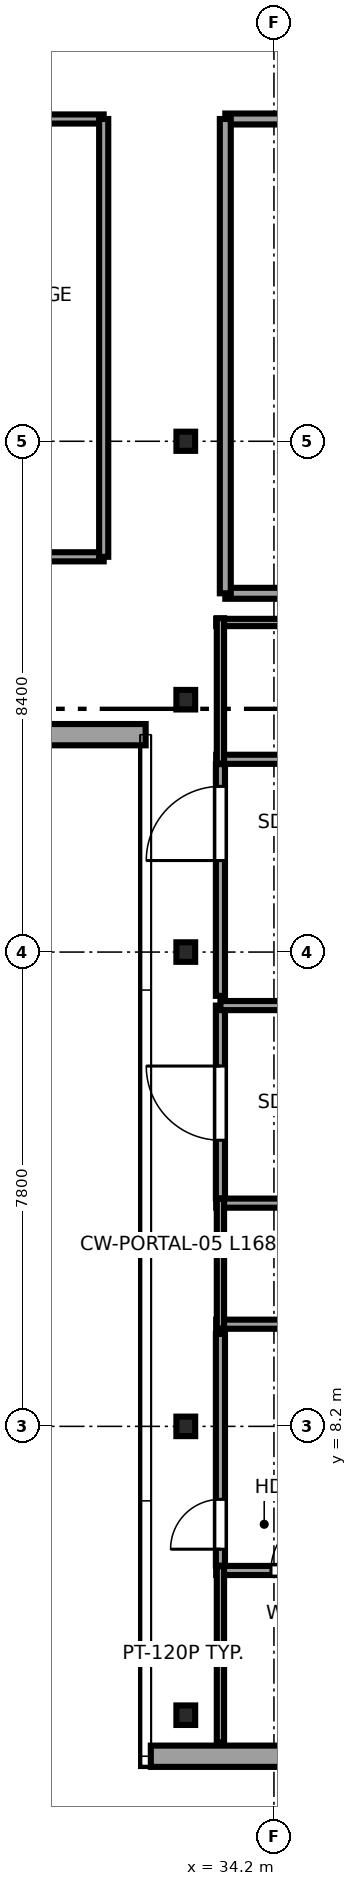
"""IFC4 building model, lengths in metres.
Left out: names, types, materials, properties, quantities, classifications, styles, units other than length and angle.
Written with IfcOpenShell. Run it as: python <this file> out.ifc"""

import sys

from ifc_helpers import new_model, si_unit, direction, frame, frame_2d, origin, origin_2d, place, context, subcontext, project, spatial, rectangle, i_section, extrude, source, transform, mapped, element, fill, save


model = new_model("IFC4")
c1 = context("Model", 3, precision=1e-05, world=origin(), true_north=direction((0.0, 1.0)))
c2 = subcontext(c1, "Body", "Model", "MODEL_VIEW")
j1 = project(units=[si_unit("LENGTHUNIT", "METRE"), si_unit("PLANEANGLEUNIT", "RADIAN")], contexts=[c1])
p1 = place(None, origin())
s1 = spatial("IfcSite", under=j1, at=p1, CompositionType="ELEMENT")
p2 = place(p1, origin())
s2 = spatial("IfcBuilding", under=s1, at=p2, CompositionType="ELEMENT")
p3 = place(p2, frame((0.0, 0.0, 259.4)))
s3 = spatial("IfcBuildingStorey", under=s2, at=p3, CompositionType="ELEMENT", Elevation=259.4)
m1 = source(origin(), c2, "Body", "SweptSolid", [
    extrude(i_section(OverallWidth=0.309, OverallDepth=0.321, WebThickness=0.014, FlangeThickness=0.022, FilletRadius=0.017, at=origin_2d()), origin(), (0.0, 0.0, 1.0), 3.55),
])
for number, where, z_axis, x_axis in (
    (1, (32.75, 3.45, 0.0), (0.0, 0.0, 1.0), (1.0, 0.0, 0.0)),
    (2, (32.75, 8.2, 0.0), (0.0, 0.0, 1.0), (1.0, 0.0, 0.0)),
    (3, (32.75, 16.0, 0.0), (0.0, 0.0, 1.0), (1.0, 0.0, 0.0)),
):
    element("IfcColumn", number, at=place(p3, frame(where, z_axis=z_axis, x_axis=x_axis)), inside=s3, PredefinedType="COLUMN", context=c2, shape_type="MappedRepresentation", body=[
        mapped(m1, transform((0.0, 0.0, 0.0), x_axis=(1.0, 0.0, 0.0), y_axis=(0.0, 1.0, 0.0), z_axis=(0.0, 0.0, 1.0), scale=1.0)),
    ])
m2 = source(origin(), c2, "Body", "SweptSolid", [
    extrude(i_section(OverallWidth=0.307, OverallDepth=0.315, WebThickness=0.012, FlangeThickness=0.019, FilletRadius=0.017, at=origin_2d()), origin(), (0.0, 0.0, 1.0), 3.55),
])
p4 = place(p3, frame((32.75, 24.4, 0.0), z_axis=(0.0, 0.0, 1.0), x_axis=(1.0, 0.0, 0.0)))
e4 = element("IfcColumn", 4, at=p4, inside=s3, PredefinedType="COLUMN", context=c2, shape_type="MappedRepresentation", body=[
    mapped(m2, transform((0.0, 0.0, 0.0), x_axis=(1.0, 0.0, 0.0), y_axis=(0.0, 1.0, 0.0), z_axis=(0.0, 0.0, 1.0), scale=1.0)),
])
p5 = place(p3, frame((32.75, 20.15, 0.0), z_axis=(0.0, 0.0, 1.0), x_axis=(1.0, 0.0, 0.0)))
e5 = element("IfcColumn", 5, at=p5, inside=s3, PredefinedType="COLUMN", context=c2, shape_type="MappedRepresentation", body=[
    mapped(m1, transform((0.0, 0.0, 0.0), x_axis=(1.0, 0.0, 0.0), y_axis=(0.0, 1.0, 0.0), z_axis=(0.0, 0.0, 1.0), scale=1.0)),
])
p6 = place(p3, frame((15.11, 19.575, 0.0), z_axis=(0.0, 0.0, 1.0), x_axis=(1.0, 0.0, 0.0)))
e6 = element("IfcWall", 6, at=p6, inside=s3, PredefinedType="SOLIDWALL", context=c2, shape_type="SweptSolid", body=[
    extrude(rectangle(XDim=16.98, YDim=0.35, at=frame_2d((8.49, 0.0))), origin(), (0.0, 0.0, 1.0), 3.37),
])
p7 = place(p6, frame((1.88, 0.0, 0.68)))
e7 = element("IfcOpeningElement", 7, at=p7, cuts=e6, PredefinedType="OPENING", context=c2, shape_type="SweptSolid", body=[
    extrude(rectangle(XDim=2.7, YDim=1.95, at=frame_2d((1.35, 0.975))), frame((0.0, 0.185, 0.0), z_axis=(0.0, -1.0, 0.0), x_axis=(1.0, 0.0, 0.0)), (0.0, 0.0, 1.0), 0.37),
])
p8 = place(p6, frame((7.14, 0.0, 0.68)))
e8 = element("IfcOpeningElement", 8, at=p8, cuts=e6, PredefinedType="OPENING", context=c2, shape_type="SweptSolid", body=[
    extrude(rectangle(XDim=2.7, YDim=1.95, at=frame_2d((1.35, 0.975))), frame((0.0, 0.185, 0.0), z_axis=(0.0, -1.0, 0.0), x_axis=(1.0, 0.0, 0.0)), (0.0, 0.0, 1.0), 0.37),
])
p9 = place(p6, frame((12.4, 0.0, 0.68)))
e9 = element("IfcOpeningElement", 9, at=p9, cuts=e6, PredefinedType="OPENING", context=c2, shape_type="SweptSolid", body=[
    extrude(rectangle(XDim=2.7, YDim=1.95, at=frame_2d((1.35, 0.975))), frame((0.0, 0.185, 0.0), z_axis=(0.0, -1.0, 0.0), x_axis=(1.0, 0.0, 0.0)), (0.0, 0.0, 1.0), 0.37),
])
p10 = place(p3, frame((32.175, 2.775, 0.0), z_axis=(0.0, 0.0, 1.0), x_axis=(1.0, 0.0, 0.0)))
e10 = element("IfcWall", 10, at=p10, inside=s3, PredefinedType="SOLIDWALL", context=c2, shape_type="SweptSolid", body=[
    extrude(rectangle(XDim=2.408, YDim=0.35, at=frame_2d((1.204, 0.0))), origin(), (0.0, 0.0, 1.0), 3.37),
])
p11 = place(p3, frame((33.25, 5.83, 0.0), z_axis=(0.0, 0.0, 1.0), x_axis=(1.0, 0.0, 0.0)))
e11 = element("IfcWall", 11, at=p11, inside=s3, PredefinedType="PARTITIONING", context=c2, shape_type="SweptSolid", body=[
    extrude(rectangle(XDim=2.722, YDim=0.15, at=frame_2d((1.361, 0.0))), origin(), (0.0, 0.0, 1.0), 3.37),
])
p12 = place(p11, frame((0.901, 0.0, 0.0)))
e12 = element("IfcOpeningElement", 12, at=p12, cuts=e11, PredefinedType="OPENING", context=c2, shape_type="SweptSolid", body=[
    extrude(rectangle(XDim=0.92, YDim=2.01, at=frame_2d((0.46, 1.005))), frame((0.0, 0.085, 0.0), z_axis=(0.0, -1.0, 0.0), x_axis=(1.0, 0.0, 0.0)), (0.0, 0.0, 1.0), 0.17),
])
p13 = place(p3, frame((33.32, 3.005, 0.0), z_axis=(0.0, 0.0, 1.0), x_axis=(0.0, 1.0, 0.0)))
e13 = element("IfcWall", 13, at=p13, inside=s3, PredefinedType="PLUMBINGWALL", context=c2, shape_type="SweptSolid", body=[
    extrude(rectangle(XDim=2.895, YDim=0.12, at=frame_2d((1.448, 0.0))), origin(), (0.0, 0.0, 1.0), 3.37),
])
p14 = place(p3, frame((33.25, 9.88, 0.0), z_axis=(0.0, 0.0, 1.0), x_axis=(1.0, 0.0, 0.0)))
e14 = element("IfcWall", 14, at=p14, inside=s3, PredefinedType="PARTITIONING", context=c2, shape_type="SweptSolid", body=[
    extrude(rectangle(XDim=5.345, YDim=0.15, at=frame_2d((2.672, 0.0))), origin(), (0.0, 0.0, 1.0), 3.37),
])
p15 = place(p3, frame((33.25, 11.871, 0.0), z_axis=(0.0, 0.0, 1.0), x_axis=(1.0, 0.0, 0.0)))
e15 = element("IfcWall", 15, at=p15, inside=s3, PredefinedType="PARTITIONING", context=c2, shape_type="SweptSolid", body=[
    extrude(rectangle(XDim=2.29, YDim=0.15, at=frame_2d((1.145, 0.0))), origin(), (0.0, 0.0, 1.0), 3.37),
])
p16 = place(p3, frame((33.32, 9.81, 0.0), z_axis=(0.0, 0.0, 1.0), x_axis=(0.0, 1.0, 0.0)))
e16 = element("IfcWall", 16, at=p16, inside=s3, PredefinedType="PLUMBINGWALL", context=c2, shape_type="SweptSolid", body=[
    extrude(rectangle(XDim=2.131, YDim=0.12, at=frame_2d((1.065, 0.0))), origin(), (0.0, 0.0, 1.0), 3.37),
])
p17 = place(p3, frame((33.25, 19.17, 0.0), z_axis=(0.0, 0.0, 1.0), x_axis=(1.0, 0.0, 0.0)))
e17 = element("IfcWall", 17, at=p17, inside=s3, PredefinedType="PARTITIONING", context=c2, shape_type="SweptSolid", body=[
    extrude(rectangle(XDim=2.29, YDim=0.15, at=frame_2d((1.145, 0.0))), origin(), (0.0, 0.0, 1.0), 3.37),
])
p18 = place(p3, frame((33.25, 21.42, 0.0), z_axis=(0.0, 0.0, 1.0), x_axis=(1.0, 0.0, 0.0)))
e18 = element("IfcWall", 18, at=p18, inside=s3, PredefinedType="PLUMBINGWALL", context=c2, shape_type="SweptSolid", body=[
    extrude(rectangle(XDim=2.29, YDim=0.12, at=frame_2d((1.145, 0.0))), origin(), (0.0, 0.0, 1.0), 3.37),
])
p19 = place(p3, frame((33.32, 19.1, 0.0), z_axis=(0.0, 0.0, 1.0), x_axis=(0.0, 1.0, 0.0)))
e19 = element("IfcWall", 19, at=p19, inside=s3, PredefinedType="PLUMBINGWALL", context=c2, shape_type="SweptSolid", body=[
    extrude(rectangle(XDim=2.39, YDim=0.12, at=frame_2d((1.195, 0.0))), origin(), (0.0, 0.0, 1.0), 3.37),
])
p20 = place(p3, frame((33.32, 5.91, 0.0), z_axis=(0.0, 0.0, 1.0), x_axis=(0.0, 1.0, 0.0)))
e20 = element("IfcWall", 20, at=p20, inside=s3, PredefinedType="PARTITIONING", context=c2, shape_type="SweptSolid", body=[
    extrude(rectangle(XDim=3.81, YDim=0.15, at=frame_2d((1.905, 0.0))), origin(), (0.0, 0.0, 1.0), 3.37),
])
p21 = place(p20, frame((0.27, 0.0, 0.0)))
e21 = element("IfcOpeningElement", 21, at=p21, cuts=e20, PredefinedType="OPENING", context=c2, shape_type="SweptSolid", body=[
    extrude(rectangle(XDim=0.82, YDim=2.01, at=frame_2d((0.41, 1.005))), frame((0.0, 0.085, 0.0), z_axis=(0.0, -1.0, 0.0), x_axis=(1.0, 0.0, 0.0)), (0.0, 0.0, 1.0), 0.17),
])
p22 = place(p3, frame((33.32, 11.951, 0.0), z_axis=(0.0, 0.0, 1.0), x_axis=(0.0, 1.0, 0.0)))
e22 = element("IfcWall", 22, at=p22, inside=s3, PredefinedType="PARTITIONING", context=c2, shape_type="SweptSolid", body=[
    extrude(rectangle(XDim=3.169, YDim=0.15, at=frame_2d((1.584, 0.0))), origin(), (0.0, 0.0, 1.0), 3.37),
])
p23 = place(p22, frame((0.955, 0.0, 0.0)))
e23 = element("IfcOpeningElement", 23, at=p23, cuts=e22, PredefinedType="OPENING", context=c2, shape_type="SweptSolid", body=[
    extrude(rectangle(XDim=1.22, YDim=2.08, at=frame_2d((0.61, 1.04))), frame((0.0, 0.085, 0.0), z_axis=(0.0, -1.0, 0.0), x_axis=(1.0, 0.0, 0.0)), (0.0, 0.0, 1.0), 0.17),
])
p24 = place(p3, frame((33.32, 15.12, 0.0), z_axis=(0.0, 0.0, 1.0), x_axis=(1.0, 0.0, 0.0)))
e24 = element("IfcWall", 24, at=p24, inside=s3, PredefinedType="PARTITIONING", context=c2, shape_type="SweptSolid", body=[
    extrude(rectangle(XDim=5.275, YDim=0.15, at=frame_2d((2.637, 0.0))), origin(), (0.0, 0.0, 1.0), 3.37),
])
p25 = place(p3, frame((33.32, 15.28, 0.0), z_axis=(0.0, 0.0, 1.0), x_axis=(0.0, 1.0, 0.0)))
e25 = element("IfcWall", 25, at=p25, inside=s3, PredefinedType="PARTITIONING", context=c2, shape_type="SweptSolid", body=[
    extrude(rectangle(XDim=3.81, YDim=0.15, at=frame_2d((1.905, 0.0))), origin(), (0.0, 0.0, 1.0), 3.37),
])
p26 = place(p25, frame((2.225, 0.0, 0.0)))
e26 = element("IfcOpeningElement", 26, at=p26, cuts=e25, PredefinedType="OPENING", context=c2, shape_type="SweptSolid", body=[
    extrude(rectangle(XDim=1.22, YDim=2.08, at=frame_2d((0.61, 1.04))), frame((0.0, 0.085, 0.0), z_axis=(0.0, -1.0, 0.0), x_axis=(1.0, 0.0, 0.0)), (0.0, 0.0, 1.0), 0.17),
])
p27 = place(p3, frame((25.6, 22.5, 0.0), z_axis=(0.0, 0.0, 1.0), x_axis=(1.0, 0.0, 0.0)))
e27 = element("IfcWall", 27, at=p27, inside=s3, PredefinedType="PARTITIONING", context=c2, shape_type="SweptSolid", body=[
    extrude(rectangle(XDim=5.8, YDim=0.15, at=frame_2d((2.9, 0.0))), origin(), (0.0, 0.0, 1.0), 3.37),
])
p28 = place(p27, frame((2.075, 0.0, 0.0)))
e28 = element("IfcOpeningElement", 28, at=p28, cuts=e27, PredefinedType="OPENING", context=c2, shape_type="SweptSolid", body=[
    extrude(rectangle(XDim=1.65, YDim=2.15, at=frame_2d((0.825, 1.075))), frame((0.0, 0.085, 0.0), z_axis=(0.0, -1.0, 0.0), x_axis=(1.0, 0.0, 0.0)), (0.0, 0.0, 1.0), 0.17),
])
p29 = place(p3, frame((25.6, 29.7, 0.0), z_axis=(0.0, 0.0, 1.0), x_axis=(1.0, 0.0, 0.0)))
e29 = element("IfcWall", 29, at=p29, inside=s3, PredefinedType="PARTITIONING", context=c2, shape_type="SweptSolid", body=[
    extrude(rectangle(XDim=5.8, YDim=0.15, at=frame_2d((2.9, 0.0))), origin(), (0.0, 0.0, 1.0), 3.37),
])
p30 = place(p3, frame((31.4, 22.5, 0.0), z_axis=(0.0, 0.0, 1.0), x_axis=(0.0, 1.0, 0.0)))
e30 = element("IfcWall", 30, at=p30, inside=s3, PredefinedType="PARTITIONING", context=c2, shape_type="SweptSolid", body=[
    extrude(rectangle(XDim=7.2, YDim=0.15, at=frame_2d((3.6, 0.0))), origin(), (0.0, 0.0, 1.0), 3.37),
])
p31 = place(p3, frame((33.4, 21.9, 0.0), z_axis=(0.0, 0.0, 1.0), x_axis=(1.0, 0.0, 0.0)))
e31 = element("IfcWall", 31, at=p31, inside=s3, PredefinedType="PARTITIONING", context=c2, shape_type="SweptSolid", body=[
    extrude(rectangle(XDim=5.195, YDim=0.18, at=frame_2d((2.598, 0.0))), origin(), (0.0, 0.0, 1.0), 3.37),
])
p32 = place(p3, frame((33.4, 29.7, 0.0), z_axis=(0.0, 0.0, 1.0), x_axis=(1.0, 0.0, 0.0)))
e32 = element("IfcWall", 32, at=p32, inside=s3, PredefinedType="PARTITIONING", context=c2, shape_type="SweptSolid", body=[
    extrude(rectangle(XDim=5.195, YDim=0.18, at=frame_2d((2.598, 0.0))), origin(), (0.0, 0.0, 1.0), 3.37),
])
p33 = place(p32, frame((1.772, 0.0, 0.0)))
e33 = element("IfcOpeningElement", 33, at=p33, cuts=e32, PredefinedType="OPENING", context=c2, shape_type="SweptSolid", body=[
    extrude(rectangle(XDim=1.65, YDim=2.15, at=frame_2d((0.825, 1.075))), frame((0.0, 0.1, 0.0), z_axis=(0.0, -1.0, 0.0), x_axis=(1.0, 0.0, 0.0)), (0.0, 0.0, 1.0), 0.2),
])
p34 = place(p3, frame((33.4, 21.9, 0.0), z_axis=(0.0, 0.0, 1.0), x_axis=(0.0, 1.0, 0.0)))
e34 = element("IfcWall", 34, at=p34, inside=s3, PredefinedType="PARTITIONING", context=c2, shape_type="SweptSolid", body=[
    extrude(rectangle(XDim=7.8, YDim=0.18, at=frame_2d((3.9, 0.0))), origin(), (0.0, 0.0, 1.0), 3.37),
])
m3 = source(origin(), c2, "Body", "SweptSolid", [
    extrude(rectangle(XDim=0.92, YDim=2.01, at=frame_2d((0.46, 1.005))), frame((0.0, 0.025, 0.0), z_axis=(0.0, -1.0, 0.0), x_axis=(1.0, 0.0, 0.0)), (0.0, 0.0, 1.0), 0.05),
])
p35 = place(p12, origin())
e35 = element("IfcDoor", 35, at=p35, inside=s3, OperationType="SINGLE_SWING_RIGHT", PredefinedType="DOOR", context=c2, shape_type="MappedRepresentation", body=[
    mapped(m3, transform((0.0, 0.0, 0.0), x_axis=(1.0, 0.0, 0.0), y_axis=(0.0, 1.0, 0.0), z_axis=(0.0, 0.0, 1.0), scale=1.0)),
])
fill(e12, e35)
m4 = source(origin(), c2, "Body", "SweptSolid", [
    extrude(rectangle(XDim=0.82, YDim=2.01, at=frame_2d((0.41, 1.005))), frame((0.0, 0.025, 0.0), z_axis=(0.0, -1.0, 0.0), x_axis=(1.0, 0.0, 0.0)), (0.0, 0.0, 1.0), 0.05),
])
p36 = place(p21, origin())
e36 = element("IfcDoor", 36, at=p36, inside=s3, OperationType="SINGLE_SWING_LEFT", PredefinedType="DOOR", context=c2, shape_type="MappedRepresentation", body=[
    mapped(m4, transform((0.0, 0.0, 0.0), x_axis=(1.0, 0.0, 0.0), y_axis=(0.0, 1.0, 0.0), z_axis=(0.0, 0.0, 1.0), scale=1.0)),
])
fill(e21, e36)
m5 = source(origin(), c2, "Body", "SweptSolid", [
    extrude(rectangle(XDim=1.22, YDim=2.08, at=frame_2d((0.61, 1.04))), frame((0.0, 0.025, 0.0), z_axis=(0.0, -1.0, 0.0), x_axis=(1.0, 0.0, 0.0)), (0.0, 0.0, 1.0), 0.05),
])
p37 = place(p23, origin())
e37 = element("IfcDoor", 37, at=p37, inside=s3, OperationType="SINGLE_SWING_RIGHT", PredefinedType="DOOR", context=c2, shape_type="MappedRepresentation", body=[
    mapped(m5, transform((0.0, 0.0, 0.0), x_axis=(1.0, 0.0, 0.0), y_axis=(0.0, 1.0, 0.0), z_axis=(0.0, 0.0, 1.0), scale=1.0)),
])
fill(e23, e37)
p38 = place(p26, origin())
e38 = element("IfcDoor", 38, at=p38, inside=s3, OperationType="SINGLE_SWING_LEFT", PredefinedType="DOOR", context=c2, shape_type="MappedRepresentation", body=[
    mapped(m5, transform((0.0, 0.0, 0.0), x_axis=(1.0, 0.0, 0.0), y_axis=(0.0, 1.0, 0.0), z_axis=(0.0, 0.0, 1.0), scale=1.0)),
])
fill(e26, e38)
save(model, sys.argv[1])
